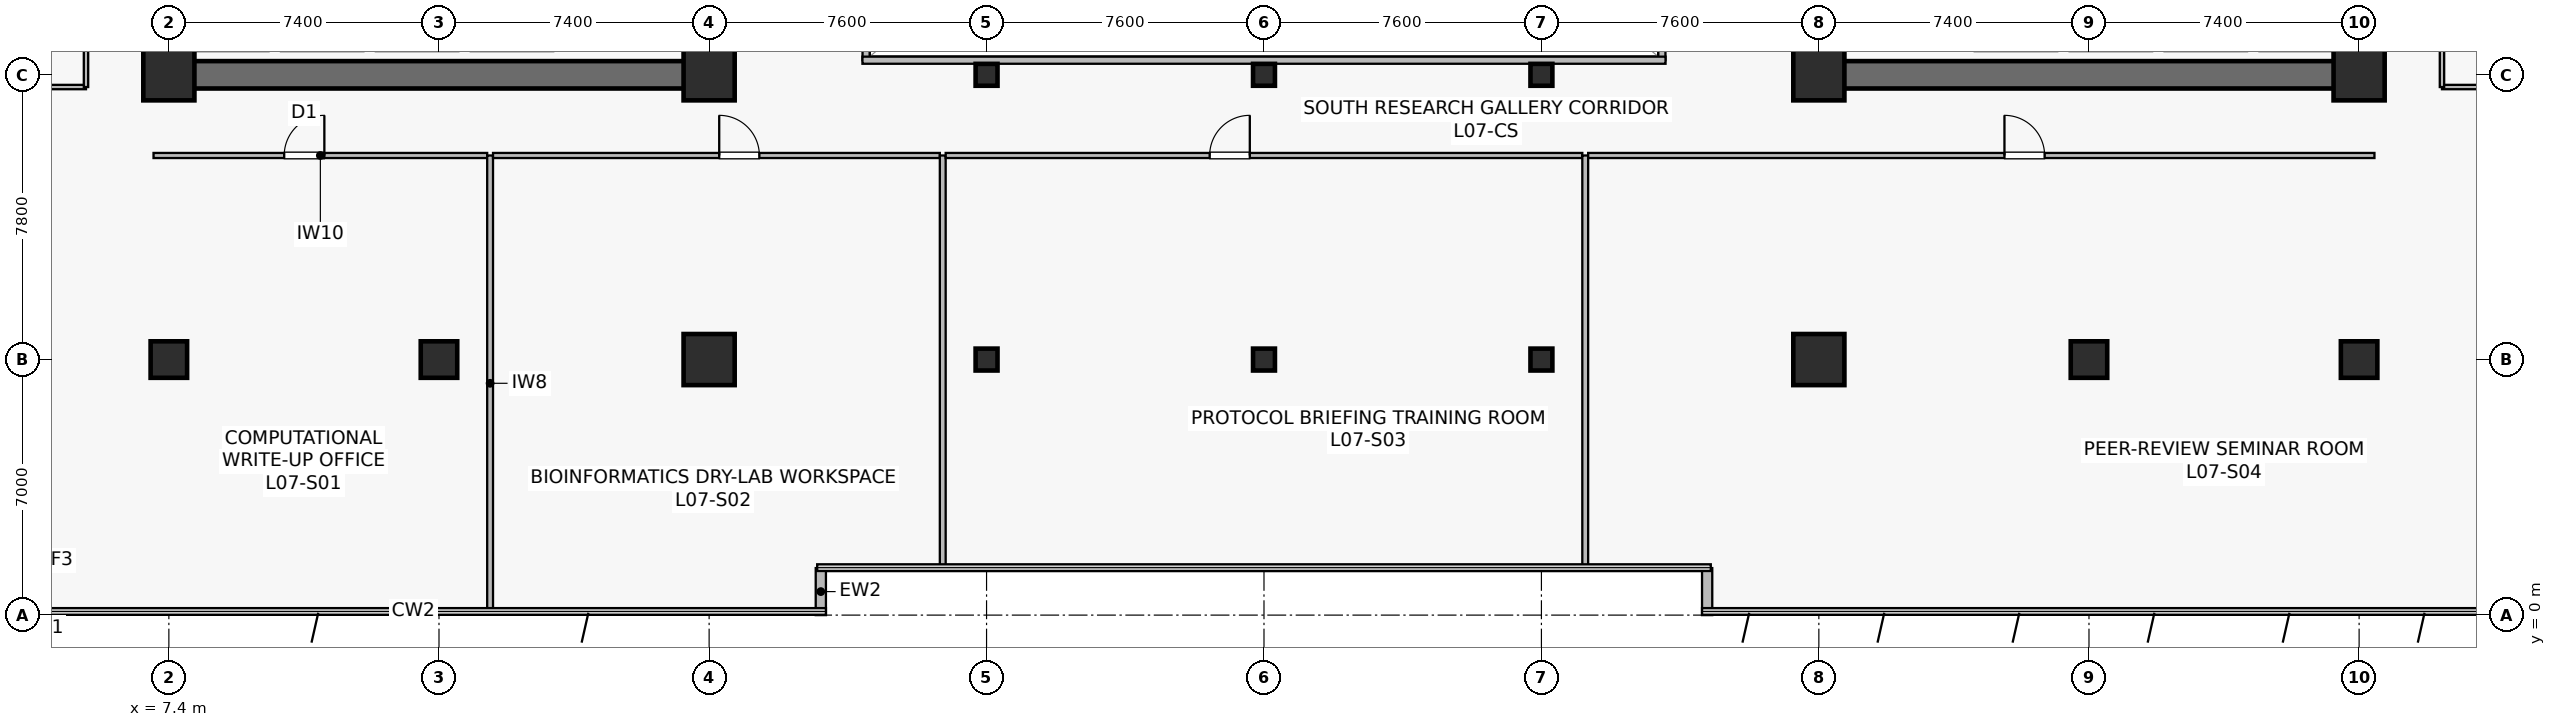
"""IFC4 building model, lengths in metres.
Left out: names, types, materials, properties, quantities, classifications, styles, units other than length and angle.
Written with IfcOpenShell. Run it as: python <this file> out.ifc"""

import sys

from ifc_helpers import new_model, si_unit, direction, frame, frame_2d, origin, origin_2d, place, context, subcontext, project, spatial, rectangle, hollow_rectangle, extrude, source, transform, mapped, element, fill, save


model = new_model("IFC4")
c1 = context("Model", 3, precision=1e-05, world=origin(), true_north=direction((0.0, 1.0)))
c2 = subcontext(c1, "Body", "Model", "MODEL_VIEW")
j1 = project(units=[si_unit("LENGTHUNIT", "METRE"), si_unit("PLANEANGLEUNIT", "RADIAN")], contexts=[c1])
p1 = place(None, origin())
s1 = spatial("IfcSite", under=j1, at=p1, CompositionType="ELEMENT")
p2 = place(p1, origin())
s2 = spatial("IfcBuilding", under=s1, at=p2, CompositionType="ELEMENT")
p3 = place(p2, frame((0.0, 0.0, 29.3)))
s3 = spatial("IfcBuildingStorey", under=s2, at=p3, CompositionType="ELEMENT", Elevation=29.3)
p4 = place(p3, frame((7.025, 14.8, 0.0), z_axis=(0.0, 0.0, 1.0), x_axis=(1.0, 0.0, 0.0)))
e1 = element("IfcWall", 1, at=p4, inside=s3, PredefinedType="SHEAR", context=c2, shape_type="SweptSolid", body=[
    extrude(rectangle(XDim=15.55, YDim=0.75, at=frame_2d((7.775, 0.0))), origin(), (0.0, 0.0, 1.0), 3.78),
])
p5 = place(p3, frame((7.4, 15.175, 0.0), z_axis=(0.0, 0.0, 1.0), x_axis=(0.0, 1.0, 0.0)))
e2 = element("IfcWall", 2, at=p5, inside=s3, PredefinedType="SHEAR", context=c2, shape_type="SweptSolid", body=[
    extrude(rectangle(XDim=18.25, YDim=0.75, at=frame_2d((9.125, 0.0))), origin(), (0.0, 0.0, 1.0), 3.78),
])
p6 = place(p3, frame((22.2, 15.175, 0.0), z_axis=(0.0, 0.0, 1.0), x_axis=(0.0, 1.0, 0.0)))
e3 = element("IfcWall", 3, at=p6, inside=s3, PredefinedType="SHEAR", context=c2, shape_type="SweptSolid", body=[
    extrude(rectangle(XDim=18.25, YDim=0.75, at=frame_2d((9.125, 0.0))), origin(), (0.0, 0.0, 1.0), 3.78),
])
p7 = place(p6, frame((3.375, 0.0, 0.0)))
e4 = element("IfcOpeningElement", 4, at=p7, cuts=e3, PredefinedType="OPENING", context=c2, shape_type="SweptSolid", body=[
    extrude(rectangle(XDim=1.42, YDim=2.2, at=frame_2d((0.71, 1.1))), frame((0.0, 0.385, 0.0), z_axis=(0.0, -1.0, 0.0), x_axis=(1.0, 0.0, 0.0)), (0.0, 0.0, 1.0), 0.77),
])
p8 = place(p3, frame((52.225, 14.8, 0.0), z_axis=(0.0, 0.0, 1.0), x_axis=(1.0, 0.0, 0.0)))
e5 = element("IfcWall", 5, at=p8, inside=s3, PredefinedType="SHEAR", context=c2, shape_type="SweptSolid", body=[
    extrude(rectangle(XDim=15.55, YDim=0.75, at=frame_2d((7.775, 0.0))), origin(), (0.0, 0.0, 1.0), 3.78),
])
p9 = place(p3, frame((52.6, 15.175, 0.0), z_axis=(0.0, 0.0, 1.0), x_axis=(0.0, 1.0, 0.0)))
e6 = element("IfcWall", 6, at=p9, inside=s3, PredefinedType="SHEAR", context=c2, shape_type="SweptSolid", body=[
    extrude(rectangle(XDim=18.25, YDim=0.75, at=frame_2d((9.125, 0.0))), origin(), (0.0, 0.0, 1.0), 3.78),
])
p10 = place(p9, frame((3.375, 0.0, 0.0)))
e7 = element("IfcOpeningElement", 7, at=p10, cuts=e6, PredefinedType="OPENING", context=c2, shape_type="SweptSolid", body=[
    extrude(rectangle(XDim=1.42, YDim=2.2, at=frame_2d((0.71, 1.1))), frame((0.0, 0.385, 0.0), z_axis=(0.0, -1.0, 0.0), x_axis=(1.0, 0.0, 0.0)), (0.0, 0.0, 1.0), 0.77),
])
p11 = place(p3, frame((67.4, 15.175, 0.0), z_axis=(0.0, 0.0, 1.0), x_axis=(0.0, 1.0, 0.0)))
e8 = element("IfcWall", 8, at=p11, inside=s3, PredefinedType="SHEAR", context=c2, shape_type="SweptSolid", body=[
    extrude(rectangle(XDim=18.25, YDim=0.75, at=frame_2d((9.125, 0.0))), origin(), (0.0, 0.0, 1.0), 3.78),
])
m1 = source(origin(), c2, "Body", "SweptSolid", [
    extrude(rectangle(XDim=1.0, YDim=1.0, at=origin_2d()), origin(), (0.0, 0.0, 1.0), 4.1),
])
p12 = place(p3, frame((14.8, 7.0, 0.0), z_axis=(0.0, 0.0, 1.0), x_axis=(1.0, 0.0, 0.0)))
e9 = element("IfcColumn", 9, at=p12, inside=s3, PredefinedType="COLUMN", context=c2, shape_type="MappedRepresentation", body=[
    mapped(m1, transform((0.0, 0.0, 0.0), scale=1.0)),
])
m2 = source(origin(), c2, "Body", "SweptSolid", [
    extrude(rectangle(XDim=1.4, YDim=1.4, at=origin_2d()), origin(), (0.0, 0.0, 1.0), 4.1),
])
for number, where, z_axis, x_axis in (
    (10, (22.2, 7.0, 0.0), (0.0, 0.0, 1.0), (1.0, 0.0, 0.0)),
    (11, (7.4, 14.8, 0.0), (0.0, 0.0, 1.0), (1.0, 0.0, 0.0)),
    (12, (22.2, 14.8, 0.0), (0.0, 0.0, 1.0), (1.0, 0.0, 0.0)),
    (13, (52.6, 7.0, 0.0), (0.0, 0.0, 1.0), (1.0, 0.0, 0.0)),
):
    element("IfcColumn", number, at=place(p3, frame(where, z_axis=z_axis, x_axis=x_axis)), inside=s3, PredefinedType="COLUMN", context=c2, shape_type="MappedRepresentation", body=[
        mapped(m2, transform((0.0, 0.0, 0.0), scale=1.0)),
    ])
p13 = place(p3, frame((60.0, 7.0, 0.0), z_axis=(0.0, 0.0, 1.0), x_axis=(1.0, 0.0, 0.0)))
e14 = element("IfcColumn", 14, at=p13, inside=s3, PredefinedType="COLUMN", context=c2, shape_type="MappedRepresentation", body=[
    mapped(m1, transform((0.0, 0.0, 0.0), scale=1.0)),
])
for number, where, z_axis, x_axis in (
    (15, (52.6, 14.8, 0.0), (0.0, 0.0, 1.0), (1.0, 0.0, 0.0)),
    (16, (67.4, 14.8, 0.0), (0.0, 0.0, 1.0), (1.0, 0.0, 0.0)),
):
    element("IfcColumn", number, at=place(p3, frame(where, z_axis=z_axis, x_axis=x_axis)), inside=s3, PredefinedType="COLUMN", context=c2, shape_type="MappedRepresentation", body=[
        mapped(m2, transform((0.0, 0.0, 0.0), scale=1.0)),
    ])
for number, where, z_axis, x_axis in (
    (17, (7.4, 7.0, 0.0), (0.0, 0.0, 1.0), (1.0, 0.0, 0.0)),
    (18, (67.4, 7.0, 0.0), (0.0, 0.0, 1.0), (1.0, 0.0, 0.0)),
):
    element("IfcColumn", number, at=place(p3, frame(where, z_axis=z_axis, x_axis=x_axis)), inside=s3, PredefinedType="COLUMN", context=c2, shape_type="MappedRepresentation", body=[
        mapped(m1, transform((0.0, 0.0, 0.0), scale=1.0)),
    ])
m3 = source(origin(), c2, "Body", "SweptSolid", [
    extrude(hollow_rectangle(XDim=0.6, YDim=0.6, WallThickness=0.028, at=origin_2d()), origin(), (0.0, 0.0, 1.0), 4.1),
])
for number, where, z_axis, x_axis in (
    (19, (29.8, 7.0, 0.0), (0.0, 0.0, 1.0), (1.0, 0.0, 0.0)),
    (20, (29.8, 14.8, 0.0), (0.0, 0.0, 1.0), (1.0, 0.0, 0.0)),
    (21, (37.4, 7.0, 0.0), (0.0, 0.0, 1.0), (1.0, 0.0, 0.0)),
    (22, (37.4, 14.8, 0.0), (0.0, 0.0, 1.0), (1.0, 0.0, 0.0)),
    (23, (45.0, 7.0, 0.0), (0.0, 0.0, 1.0), (1.0, 0.0, 0.0)),
    (24, (45.0, 14.8, 0.0), (0.0, 0.0, 1.0), (1.0, 0.0, 0.0)),
):
    element("IfcColumn", number, at=place(p3, frame(where, z_axis=z_axis, x_axis=x_axis)), inside=s3, PredefinedType="COLUMN", context=c2, shape_type="MappedRepresentation", body=[
        mapped(m3, transform((0.0, 0.0, 0.0), scale=1.0)),
    ])
for number, where, z_axis, x_axis in (
    (25, (25.26, 0.0, 0.0), (0.0, 0.0, 1.0), (0.0, 1.0, 0.0)),
    (26, (49.54, 1.288, 0.0), (0.0, 0.0, 1.0), (0.0, -1.0, 0.0)),
):
    element("IfcWall", number, at=place(p3, frame(where, z_axis=z_axis, x_axis=x_axis)), inside=s3, PredefinedType="STANDARD", context=c2, shape_type="SweptSolid", body=[
        extrude(rectangle(XDim=1.288, YDim=0.28, at=frame_2d((0.644, 0.0))), origin(), (0.0, 0.0, 1.0), 3.78),
    ])
p14 = place(p3, frame((26.5, 15.2, 0.0), z_axis=(0.0, 0.0, 1.0), x_axis=(0.0, 1.0, 0.0)))
e27 = element("IfcWall", 27, at=p14, inside=s3, PredefinedType="SOLIDWALL", context=c2, shape_type="SweptSolid", body=[
    extrude(rectangle(XDim=18.2, YDim=0.195, at=frame_2d((9.1, 0.0))), origin(), (0.0, 0.0, 1.0), 3.78),
])
p15 = place(p14, frame((1.8, 0.0, 0.9)))
e28 = element("IfcOpeningElement", 28, at=p15, cuts=e27, PredefinedType="OPENING", context=c2, shape_type="SweptSolid", body=[
    extrude(rectangle(XDim=1.2, YDim=1.35, at=frame_2d((0.6, 0.675))), frame((0.0, 0.107, 0.0), z_axis=(0.0, -1.0, 0.0), x_axis=(1.0, 0.0, 0.0)), (0.0, 0.0, 1.0), 0.215),
])
p16 = place(p14, frame((13.2, 0.0, 0.9)))
e29 = element("IfcOpeningElement", 29, at=p16, cuts=e27, PredefinedType="OPENING", context=c2, shape_type="SweptSolid", body=[
    extrude(rectangle(XDim=1.2, YDim=1.35, at=frame_2d((0.6, 0.675))), frame((0.0, 0.107, 0.0), z_axis=(0.0, -1.0, 0.0), x_axis=(1.0, 0.0, 0.0)), (0.0, 0.0, 1.0), 0.215),
])
p17 = place(p3, frame((48.3, 15.2, 0.0), z_axis=(0.0, 0.0, 1.0), x_axis=(0.0, 1.0, 0.0)))
e30 = element("IfcWall", 30, at=p17, inside=s3, PredefinedType="SOLIDWALL", context=c2, shape_type="SweptSolid", body=[
    extrude(rectangle(XDim=18.2, YDim=0.195, at=frame_2d((9.1, 0.0))), origin(), (0.0, 0.0, 1.0), 3.78),
])
p18 = place(p17, frame((1.8, 0.0, 0.9)))
e31 = element("IfcOpeningElement", 31, at=p18, cuts=e30, PredefinedType="OPENING", context=c2, shape_type="SweptSolid", body=[
    extrude(rectangle(XDim=1.2, YDim=1.35, at=frame_2d((0.6, 0.675))), frame((0.0, 0.107, 0.0), z_axis=(0.0, -1.0, 0.0), x_axis=(1.0, 0.0, 0.0)), (0.0, 0.0, 1.0), 0.215),
])
p19 = place(p17, frame((13.2, 0.0, 0.9)))
e32 = element("IfcOpeningElement", 32, at=p19, cuts=e30, PredefinedType="OPENING", context=c2, shape_type="SweptSolid", body=[
    extrude(rectangle(XDim=1.2, YDim=1.35, at=frame_2d((0.6, 0.675))), frame((0.0, 0.107, 0.0), z_axis=(0.0, -1.0, 0.0), x_axis=(1.0, 0.0, 0.0)), (0.0, 0.0, 1.0), 0.215),
])
p20 = place(p3, frame((26.4, 15.2, 0.0), z_axis=(0.0, 0.0, 1.0), x_axis=(1.0, 0.0, 0.0)))
e33 = element("IfcWall", 33, at=p20, inside=s3, PredefinedType="SOLIDWALL", context=c2, shape_type="SweptSolid", body=[
    extrude(rectangle(XDim=22.0, YDim=0.195, at=frame_2d((11.0, 0.0))), origin(), (0.0, 0.0, 1.0), 3.78),
])
p21 = place(p3, frame((6.98, 12.59, 0.0), z_axis=(0.0, 0.0, 1.0), x_axis=(1.0, 0.0, 0.0)))
e34 = element("IfcWall", 34, at=p21, inside=s3, PredefinedType="PARTITIONING", context=c2, shape_type="SweptSolid", body=[
    extrude(rectangle(XDim=9.14, YDim=0.14, at=frame_2d((4.57, 0.0))), origin(), (0.0, 0.0, 1.0), 3.065),
])
p22 = place(p21, frame((3.58, 0.0, 0.0)))
e35 = element("IfcOpeningElement", 35, at=p22, cuts=e34, PredefinedType="OPENING", context=c2, shape_type="SweptSolid", body=[
    extrude(rectangle(XDim=1.1, YDim=2.18, at=frame_2d((0.55, 1.09))), frame((0.0, 0.08, 0.0), z_axis=(0.0, -1.0, 0.0), x_axis=(1.0, 0.0, 0.0)), (0.0, 0.0, 1.0), 0.16),
])
p23 = place(p3, frame((16.2, 0.11, 0.0), z_axis=(0.0, 0.0, 1.0), x_axis=(0.0, 1.0, 0.0)))
e36 = element("IfcWall", 36, at=p23, inside=s3, PredefinedType="PARTITIONING", context=c2, shape_type="SweptSolid", body=[
    extrude(rectangle(XDim=12.48, YDim=0.16, at=frame_2d((6.24, 0.0))), origin(), (0.0, 0.0, 1.0), 3.015),
])
p24 = place(p3, frame((16.28, 12.59, 0.0), z_axis=(0.0, 0.0, 1.0), x_axis=(1.0, 0.0, 0.0)))
e37 = element("IfcWall", 37, at=p24, inside=s3, PredefinedType="PARTITIONING", context=c2, shape_type="SweptSolid", body=[
    extrude(rectangle(XDim=12.24, YDim=0.14, at=frame_2d((6.12, 0.0))), origin(), (0.0, 0.0, 1.0), 3.065),
])
p25 = place(p24, frame((6.196, 0.0, 0.0)))
e38 = element("IfcOpeningElement", 38, at=p25, cuts=e37, PredefinedType="OPENING", context=c2, shape_type="SweptSolid", body=[
    extrude(rectangle(XDim=1.1, YDim=2.18, at=frame_2d((0.55, 1.09))), frame((0.0, 0.08, 0.0), z_axis=(0.0, -1.0, 0.0), x_axis=(1.0, 0.0, 0.0)), (0.0, 0.0, 1.0), 0.16),
])
p26 = place(p3, frame((28.6, 1.31, 0.0), z_axis=(0.0, 0.0, 1.0), x_axis=(0.0, 1.0, 0.0)))
e39 = element("IfcWall", 39, at=p26, inside=s3, PredefinedType="PARTITIONING", context=c2, shape_type="SweptSolid", body=[
    extrude(rectangle(XDim=11.28, YDim=0.16, at=frame_2d((5.64, 0.0))), origin(), (0.0, 0.0, 1.0), 3.015),
])
p27 = place(p3, frame((28.68, 12.59, 0.0), z_axis=(0.0, 0.0, 1.0), x_axis=(1.0, 0.0, 0.0)))
e40 = element("IfcWall", 40, at=p27, inside=s3, PredefinedType="PARTITIONING", context=c2, shape_type="SweptSolid", body=[
    extrude(rectangle(XDim=17.44, YDim=0.14, at=frame_2d((8.72, 0.0))), origin(), (0.0, 0.0, 1.0), 3.065),
])
p28 = place(p27, frame((7.232, 0.0, 0.0)))
e41 = element("IfcOpeningElement", 41, at=p28, cuts=e40, PredefinedType="OPENING", context=c2, shape_type="SweptSolid", body=[
    extrude(rectangle(XDim=1.1, YDim=2.18, at=frame_2d((0.55, 1.09))), frame((0.0, 0.08, 0.0), z_axis=(0.0, -1.0, 0.0), x_axis=(1.0, 0.0, 0.0)), (0.0, 0.0, 1.0), 0.16),
])
p29 = place(p3, frame((46.2, 1.31, 0.0), z_axis=(0.0, 0.0, 1.0), x_axis=(0.0, 1.0, 0.0)))
e42 = element("IfcWall", 42, at=p29, inside=s3, PredefinedType="PARTITIONING", context=c2, shape_type="SweptSolid", body=[
    extrude(rectangle(XDim=11.28, YDim=0.16, at=frame_2d((5.64, 0.0))), origin(), (0.0, 0.0, 1.0), 3.015),
])
p30 = place(p3, frame((46.28, 12.59, 0.0), z_axis=(0.0, 0.0, 1.0), x_axis=(1.0, 0.0, 0.0)))
e43 = element("IfcWall", 43, at=p30, inside=s3, PredefinedType="PARTITIONING", context=c2, shape_type="SweptSolid", body=[
    extrude(rectangle(XDim=21.54, YDim=0.14, at=frame_2d((10.77, 0.0))), origin(), (0.0, 0.0, 1.0), 3.065),
])
p31 = place(p30, frame((11.404, 0.0, 0.0)))
e44 = element("IfcOpeningElement", 44, at=p31, cuts=e43, PredefinedType="OPENING", context=c2, shape_type="SweptSolid", body=[
    extrude(rectangle(XDim=1.1, YDim=2.18, at=frame_2d((0.55, 1.09))), frame((0.0, 0.08, 0.0), z_axis=(0.0, -1.0, 0.0), x_axis=(1.0, 0.0, 0.0)), (0.0, 0.0, 1.0), 0.16),
])
p32 = place(p3, frame((0.11, 14.465, 0.0), z_axis=(0.0, 0.0, 1.0), x_axis=(1.0, 0.0, 0.0)))
e45 = element("IfcWall", 45, at=p32, inside=s3, PredefinedType="PARTITIONING", context=c2, shape_type="SweptSolid", body=[
    extrude(rectangle(XDim=5.02, YDim=0.12, at=frame_2d((2.51, 0.0))), origin(), (0.0, 0.0, 1.0), 3.78),
])
p33 = place(p3, frame((5.13, 14.465, 0.0), z_axis=(0.0, 0.0, 1.0), x_axis=(0.0, 1.0, 0.0)))
e46 = element("IfcWall", 46, at=p33, inside=s3, PredefinedType="PARTITIONING", context=c2, shape_type="SweptSolid", body=[
    extrude(rectangle(XDim=7.875, YDim=0.12, at=frame_2d((3.938, 0.0))), origin(), (0.0, 0.0, 1.0), 3.78),
])
p34 = place(p33, frame((3.488, 0.0, 0.0)))
e47 = element("IfcOpeningElement", 47, at=p34, cuts=e46, PredefinedType="OPENING", context=c2, shape_type="SweptSolid", body=[
    extrude(rectangle(XDim=0.9, YDim=2.1, at=frame_2d((0.45, 1.05))), frame((0.0, 0.07, 0.0), z_axis=(0.0, -1.0, 0.0), x_axis=(1.0, 0.0, 0.0)), (0.0, 0.0, 1.0), 0.14),
])
p35 = place(p3, frame((69.67, 14.465, 0.0), z_axis=(0.0, 0.0, 1.0), x_axis=(1.0, 0.0, 0.0)))
e48 = element("IfcWall", 48, at=p35, inside=s3, PredefinedType="PARTITIONING", context=c2, shape_type="SweptSolid", body=[
    extrude(rectangle(XDim=5.02, YDim=0.12, at=frame_2d((2.51, 0.0))), origin(), (0.0, 0.0, 1.0), 3.78),
])
p36 = place(p3, frame((69.67, 14.465, 0.0), z_axis=(0.0, 0.0, 1.0), x_axis=(0.0, 1.0, 0.0)))
e49 = element("IfcWall", 49, at=p36, inside=s3, PredefinedType="PARTITIONING", context=c2, shape_type="SweptSolid", body=[
    extrude(rectangle(XDim=11.275, YDim=0.12, at=frame_2d((5.637, 0.0))), origin(), (0.0, 0.0, 1.0), 3.78),
])
p37 = place(p36, frame((5.188, 0.0, 0.0)))
e50 = element("IfcOpeningElement", 50, at=p37, cuts=e49, PredefinedType="OPENING", context=c2, shape_type="SweptSolid", body=[
    extrude(rectangle(XDim=0.9, YDim=2.1, at=frame_2d((0.45, 1.05))), frame((0.0, 0.07, 0.0), z_axis=(0.0, -1.0, 0.0), x_axis=(1.0, 0.0, 0.0)), (0.0, 0.0, 1.0), 0.14),
])
m4 = source(origin(), c2, "Body", "SweptSolid", [
    extrude(rectangle(XDim=1.1, YDim=2.18, at=frame_2d((0.55, 1.09))), frame((0.0, 0.025, 0.0), z_axis=(0.0, -1.0, 0.0), x_axis=(1.0, 0.0, 0.0)), (0.0, 0.0, 1.0), 0.05),
])
p38 = place(p22, origin())
e51 = element("IfcDoor", 51, at=p38, inside=s3, OperationType="SINGLE_SWING_RIGHT", PredefinedType="DOOR", context=c2, shape_type="MappedRepresentation", body=[
    mapped(m4, transform((0.0, 0.0, 0.0), scale=1.0)),
])
fill(e35, e51)
p39 = place(p25, origin())
e52 = element("IfcDoor", 52, at=p39, inside=s3, OperationType="SINGLE_SWING_LEFT", PredefinedType="DOOR", context=c2, shape_type="MappedRepresentation", body=[
    mapped(m4, transform((0.0, 0.0, 0.0), scale=1.0)),
])
fill(e38, e52)
p40 = place(p28, origin())
e53 = element("IfcDoor", 53, at=p40, inside=s3, OperationType="SINGLE_SWING_RIGHT", PredefinedType="DOOR", context=c2, shape_type="MappedRepresentation", body=[
    mapped(m4, transform((0.0, 0.0, 0.0), scale=1.0)),
])
fill(e41, e53)
p41 = place(p31, origin())
e54 = element("IfcDoor", 54, at=p41, inside=s3, OperationType="SINGLE_SWING_LEFT", PredefinedType="DOOR", context=c2, shape_type="MappedRepresentation", body=[
    mapped(m4, transform((0.0, 0.0, 0.0), scale=1.0)),
])
fill(e44, e54)
save(model, sys.argv[1])
